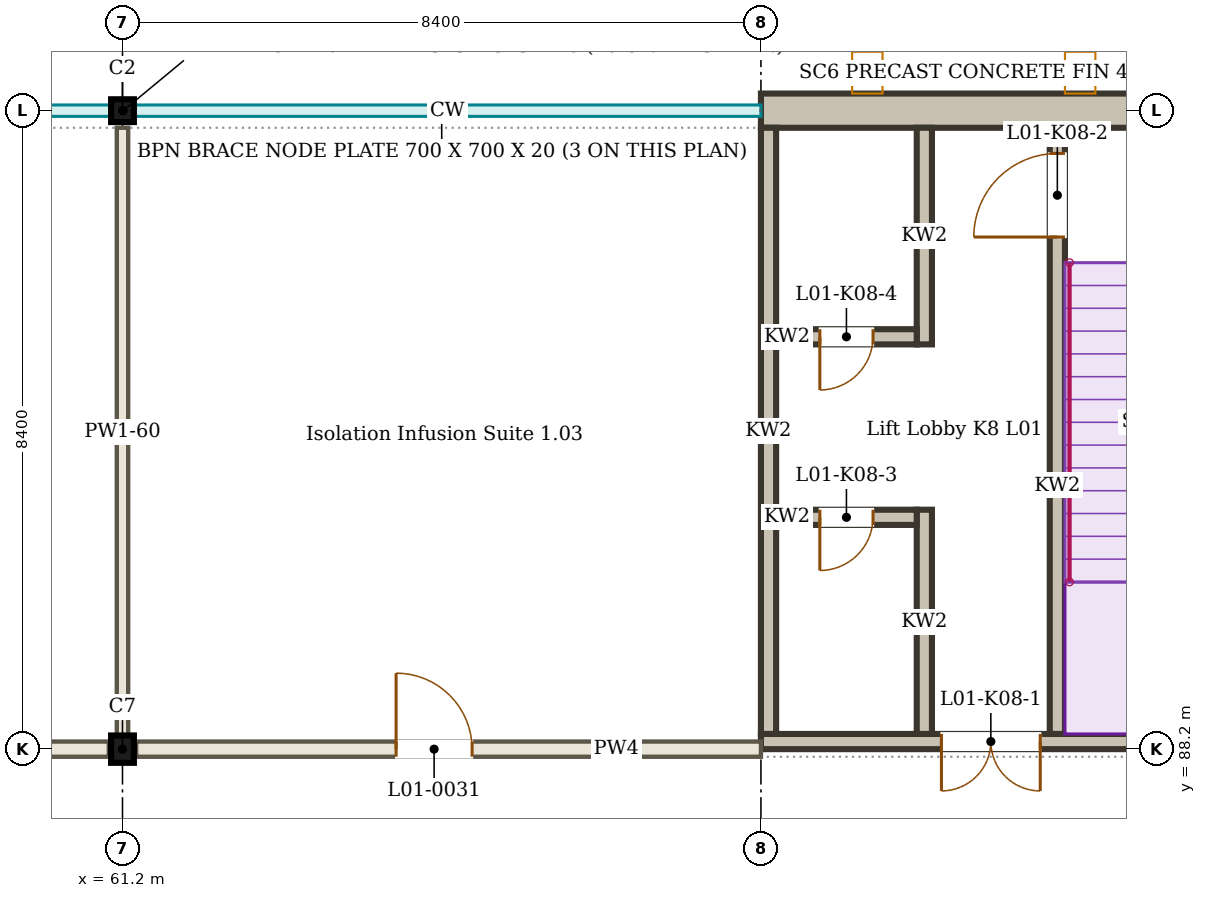
"""IFC4 building model, lengths in metres.
Left out: names, types, materials, properties, quantities, classifications, styles, units other than length and angle.
Written with IfcOpenShell. Run it as: python <this file> out.ifc"""

import sys

from ifc_helpers import new_model, si_unit, direction, frame, frame_2d, origin, origin_2d, place, context, subcontext, project, spatial, rectangle, i_section, extrude, element, fill, save


model = new_model("IFC4")
c1 = context("Model", 3, precision=1e-05, world=origin(), true_north=direction((0.0, 1.0)))
c2 = subcontext(c1, "Body", "Model", "MODEL_VIEW")
j1 = project(units=[si_unit("LENGTHUNIT", "METRE"), si_unit("PLANEANGLEUNIT", "RADIAN")], contexts=[c1])
p1 = place(None, origin())
s1 = spatial("IfcSite", under=j1, at=p1, CompositionType="ELEMENT")
p2 = place(p1, origin())
s2 = spatial("IfcBuilding", under=s1, at=p2, CompositionType="ELEMENT")
p3 = place(p2, frame((0.0, 0.0, 4.5)))
s3 = spatial("IfcBuildingStorey", under=s2, at=p3, CompositionType="ELEMENT", Elevation=4.5)
p4 = place(p3, frame((61.2, 88.2, 0.0), z_axis=(0.0, 0.0, 1.0), x_axis=(1.0, 0.0, 0.0)))
e1 = element("IfcColumn", 1, at=p4, inside=s3, PredefinedType="COLUMN", context=c2, shape_type="SweptSolid", body=[
    extrude(i_section(OverallWidth=0.3, OverallDepth=0.36, WebThickness=0.012, FlangeThickness=0.022, FilletRadius=0.027, at=origin_2d()), origin(), (0.0, 0.0, 1.0), 4.5),
])
p5 = place(p3, frame((61.2, 96.6, 0.0), z_axis=(0.0, 0.0, 1.0), x_axis=(1.0, 0.0, 0.0)))
e2 = element("IfcColumn", 2, at=p5, inside=s3, PredefinedType="COLUMN", context=c2, shape_type="SweptSolid", body=[
    extrude(i_section(OverallWidth=0.3, OverallDepth=0.3, WebThickness=0.011, FlangeThickness=0.019, FilletRadius=0.027, at=origin_2d()), origin(), (0.0, 0.0, 1.0), 4.5),
])
p6 = place(p3, frame((52.98, 88.2, 0.0), z_axis=(0.0, 0.0, 1.0), x_axis=(1.0, 0.0, 0.0)))
e3 = element("IfcWall", 3, at=p6, inside=s3, PredefinedType="PARTITIONING", context=c2, shape_type="SweptSolid", body=[
    extrude(rectangle(XDim=8.04, YDim=0.2, at=frame_2d((4.02, 0.0))), origin(), (0.0, 0.0, 1.0), 3.8),
])
p7 = place(p6, frame((3.42, 0.0, 0.0)))
e4 = element("IfcOpeningElement", 4, at=p7, cuts=e3, PredefinedType="OPENING", context=c2, shape_type="SweptSolid", body=[
    extrude(rectangle(XDim=1.0, YDim=2.1, at=frame_2d((0.5, 1.05))), frame((0.0, 0.11, 0.0), z_axis=(0.0, -1.0, 0.0), x_axis=(1.0, 0.0, 0.0)), (0.0, 0.0, 1.0), 0.22),
])
p8 = place(p3, frame((61.38, 88.2, 0.0), z_axis=(0.0, 0.0, 1.0), x_axis=(1.0, 0.0, 0.0)))
e5 = element("IfcWall", 5, at=p8, inside=s3, PredefinedType="PARTITIONING", context=c2, shape_type="SweptSolid", body=[
    extrude(rectangle(XDim=8.22, YDim=0.2, at=frame_2d((4.11, 0.0))), origin(), (0.0, 0.0, 1.0), 3.8),
])
p9 = place(p8, frame((3.42, 0.0, 0.0)))
e6 = element("IfcOpeningElement", 6, at=p9, cuts=e5, PredefinedType="OPENING", context=c2, shape_type="SweptSolid", body=[
    extrude(rectangle(XDim=1.0, YDim=2.1, at=frame_2d((0.5, 1.05))), frame((0.0, 0.11, 0.0), z_axis=(0.0, -1.0, 0.0), x_axis=(1.0, 0.0, 0.0)), (0.0, 0.0, 1.0), 0.22),
])
p10 = place(p3, frame((61.2, 88.38, 0.0), z_axis=(0.0, 0.0, 1.0), x_axis=(0.0, 1.0, 0.0)))
e7 = element("IfcWall", 7, at=p10, inside=s3, PredefinedType="PARTITIONING", context=c2, shape_type="SweptSolid", body=[
    extrude(rectangle(XDim=7.995, YDim=0.15, at=frame_2d((3.998, 0.0))), origin(), (0.0, 0.0, 1.0), 3.8),
])
p11 = place(p3, frame((78.0, 88.3, 0.0), z_axis=(0.0, 0.0, 1.0), x_axis=(-1.0, 0.0, 0.0)))
e8 = element("IfcWall", 8, at=p11, inside=s3, PredefinedType="SOLIDWALL", context=c2, shape_type="SweptSolid", body=[
    extrude(rectangle(XDim=8.4, YDim=0.2, at=frame_2d((4.2, 0.0))), origin(), (0.0, 0.0, 1.0), 4.5),
])
p12 = place(p11, frame((4.725, 0.0, 0.0)))
e9 = element("IfcOpeningElement", 9, at=p12, cuts=e8, PredefinedType="OPENING", context=c2, shape_type="SweptSolid", body=[
    extrude(rectangle(XDim=1.3, YDim=2.1, at=frame_2d((0.65, 1.05))), frame((0.0, 0.11, 0.0), z_axis=(0.0, -1.0, 0.0), x_axis=(1.0, 0.0, 0.0)), (0.0, 0.0, 1.0), 0.22),
])
p13 = place(p3, frame((78.0, 96.6, 0.0), z_axis=(0.0, 0.0, 1.0), x_axis=(-1.0, 0.0, 0.0)))
e10 = element("IfcWall", 10, at=p13, inside=s3, PredefinedType="SOLIDWALL", context=c2, shape_type="SweptSolid", body=[
    extrude(rectangle(XDim=8.4, YDim=0.45, at=frame_2d((4.2, 0.0))), origin(), (0.0, 0.0, 1.0), 4.5),
])
p14 = place(p3, frame((69.7, 88.4, 0.0), z_axis=(0.0, 0.0, 1.0), x_axis=(0.0, 1.0, 0.0)))
e11 = element("IfcWall", 11, at=p14, inside=s3, PredefinedType="SOLIDWALL", context=c2, shape_type="SweptSolid", body=[
    extrude(rectangle(XDim=7.975, YDim=0.2, at=frame_2d((3.988, 0.0))), origin(), (0.0, 0.0, 1.0), 4.5),
])
p15 = place(p3, frame((73.5, 88.4, 0.0), z_axis=(0.0, 0.0, 1.0), x_axis=(0.0, 1.0, 0.0)))
e12 = element("IfcWall", 12, at=p15, inside=s3, PredefinedType="SOLIDWALL", context=c2, shape_type="SweptSolid", body=[
    extrude(rectangle(XDim=7.975, YDim=0.2, at=frame_2d((3.988, 0.0))), origin(), (0.0, 0.0, 1.0), 4.5),
])
p16 = place(p15, frame((6.538, 0.0, 0.0)))
e13 = element("IfcOpeningElement", 13, at=p16, cuts=e12, PredefinedType="OPENING", context=c2, shape_type="SweptSolid", body=[
    extrude(rectangle(XDim=1.1, YDim=2.1, at=frame_2d((0.55, 1.05))), frame((0.0, 0.11, 0.0), z_axis=(0.0, -1.0, 0.0), x_axis=(1.0, 0.0, 0.0)), (0.0, 0.0, 1.0), 0.22),
])
p17 = place(p3, frame((71.75, 88.4, 0.0), z_axis=(0.0, 0.0, 1.0), x_axis=(0.0, 1.0, 0.0)))
e14 = element("IfcWall", 14, at=p17, inside=s3, PredefinedType="SOLIDWALL", context=c2, shape_type="SweptSolid", body=[
    extrude(rectangle(XDim=2.95, YDim=0.2, at=frame_2d((1.475, 0.0))), origin(), (0.0, 0.0, 1.0), 4.35),
])
p18 = place(p3, frame((71.75, 93.525, 0.0), z_axis=(0.0, 0.0, 1.0), x_axis=(0.0, 1.0, 0.0)))
e15 = element("IfcWall", 15, at=p18, inside=s3, PredefinedType="SOLIDWALL", context=c2, shape_type="SweptSolid", body=[
    extrude(rectangle(XDim=2.85, YDim=0.2, at=frame_2d((1.425, 0.0))), origin(), (0.0, 0.0, 1.0), 4.35),
])
p19 = place(p3, frame((71.65, 91.25, 0.0), z_axis=(0.0, 0.0, 1.0), x_axis=(-1.0, 0.0, 0.0)))
e16 = element("IfcWall", 16, at=p19, inside=s3, PredefinedType="SOLIDWALL", context=c2, shape_type="SweptSolid", body=[
    extrude(rectangle(XDim=1.85, YDim=0.2, at=frame_2d((0.925, 0.0))), origin(), (0.0, 0.0, 1.0), 4.35),
])
p20 = place(p19, frame((0.575, 0.0, 0.0)))
e17 = element("IfcOpeningElement", 17, at=p20, cuts=e16, PredefinedType="OPENING", context=c2, shape_type="SweptSolid", body=[
    extrude(rectangle(XDim=0.7, YDim=2.1, at=frame_2d((0.35, 1.05))), frame((0.0, 0.11, 0.0), z_axis=(0.0, -1.0, 0.0), x_axis=(1.0, 0.0, 0.0)), (0.0, 0.0, 1.0), 0.22),
])
p21 = place(p3, frame((71.65, 93.625, 0.0), z_axis=(0.0, 0.0, 1.0), x_axis=(-1.0, 0.0, 0.0)))
e18 = element("IfcWall", 18, at=p21, inside=s3, PredefinedType="SOLIDWALL", context=c2, shape_type="SweptSolid", body=[
    extrude(rectangle(XDim=1.85, YDim=0.2, at=frame_2d((0.925, 0.0))), origin(), (0.0, 0.0, 1.0), 4.35),
])
p22 = place(p21, frame((0.575, 0.0, 0.0)))
e19 = element("IfcOpeningElement", 19, at=p22, cuts=e18, PredefinedType="OPENING", context=c2, shape_type="SweptSolid", body=[
    extrude(rectangle(XDim=0.7, YDim=2.1, at=frame_2d((0.35, 1.05))), frame((0.0, 0.11, 0.0), z_axis=(0.0, -1.0, 0.0), x_axis=(1.0, 0.0, 0.0)), (0.0, 0.0, 1.0), 0.22),
])
p23 = place(p9, origin())
e20 = element("IfcDoor", 20, at=p23, inside=s3, OperationType="SINGLE_SWING_LEFT", PredefinedType="DOOR", context=c2, shape_type="SweptSolid", body=[
    extrude(rectangle(XDim=1.0, YDim=2.1, at=frame_2d((0.5, 1.05))), frame((0.0, 0.025, 0.0), z_axis=(0.0, -1.0, 0.0), x_axis=(1.0, 0.0, 0.0)), (0.0, 0.0, 1.0), 0.05),
])
fill(e6, e20)
p24 = place(p12, origin())
e21 = element("IfcDoor", 21, at=p24, inside=s3, OperationType="DOUBLE_DOOR_DOUBLE_SWING", PredefinedType="DOOR", context=c2, shape_type="SweptSolid", body=[
    extrude(rectangle(XDim=1.3, YDim=2.1, at=frame_2d((0.65, 1.05))), frame((0.0, 0.025, 0.0), z_axis=(0.0, -1.0, 0.0), x_axis=(1.0, 0.0, 0.0)), (0.0, 0.0, 1.0), 0.05),
])
fill(e9, e21)
p25 = place(p16, origin())
e22 = element("IfcDoor", 22, at=p25, inside=s3, OperationType="SINGLE_SWING_LEFT", PredefinedType="DOOR", context=c2, shape_type="SweptSolid", body=[
    extrude(rectangle(XDim=1.1, YDim=2.1, at=frame_2d((0.55, 1.05))), frame((0.0, 0.025, 0.0), z_axis=(0.0, -1.0, 0.0), x_axis=(1.0, 0.0, 0.0)), (0.0, 0.0, 1.0), 0.05),
])
fill(e13, e22)
p26 = place(p20, origin())
e23 = element("IfcDoor", 23, at=p26, inside=s3, OperationType="SINGLE_SWING_RIGHT", PredefinedType="DOOR", context=c2, shape_type="SweptSolid", body=[
    extrude(rectangle(XDim=0.7, YDim=2.1, at=frame_2d((0.35, 1.05))), frame((0.0, 0.025, 0.0), z_axis=(0.0, -1.0, 0.0), x_axis=(1.0, 0.0, 0.0)), (0.0, 0.0, 1.0), 0.05),
])
fill(e17, e23)
p27 = place(p22, origin())
e24 = element("IfcDoor", 24, at=p27, inside=s3, OperationType="SINGLE_SWING_RIGHT", PredefinedType="DOOR", context=c2, shape_type="SweptSolid", body=[
    extrude(rectangle(XDim=0.7, YDim=2.1, at=frame_2d((0.35, 1.05))), frame((0.0, 0.025, 0.0), z_axis=(0.0, -1.0, 0.0), x_axis=(1.0, 0.0, 0.0)), (0.0, 0.0, 1.0), 0.05),
])
fill(e19, e24)
save(model, sys.argv[1])
